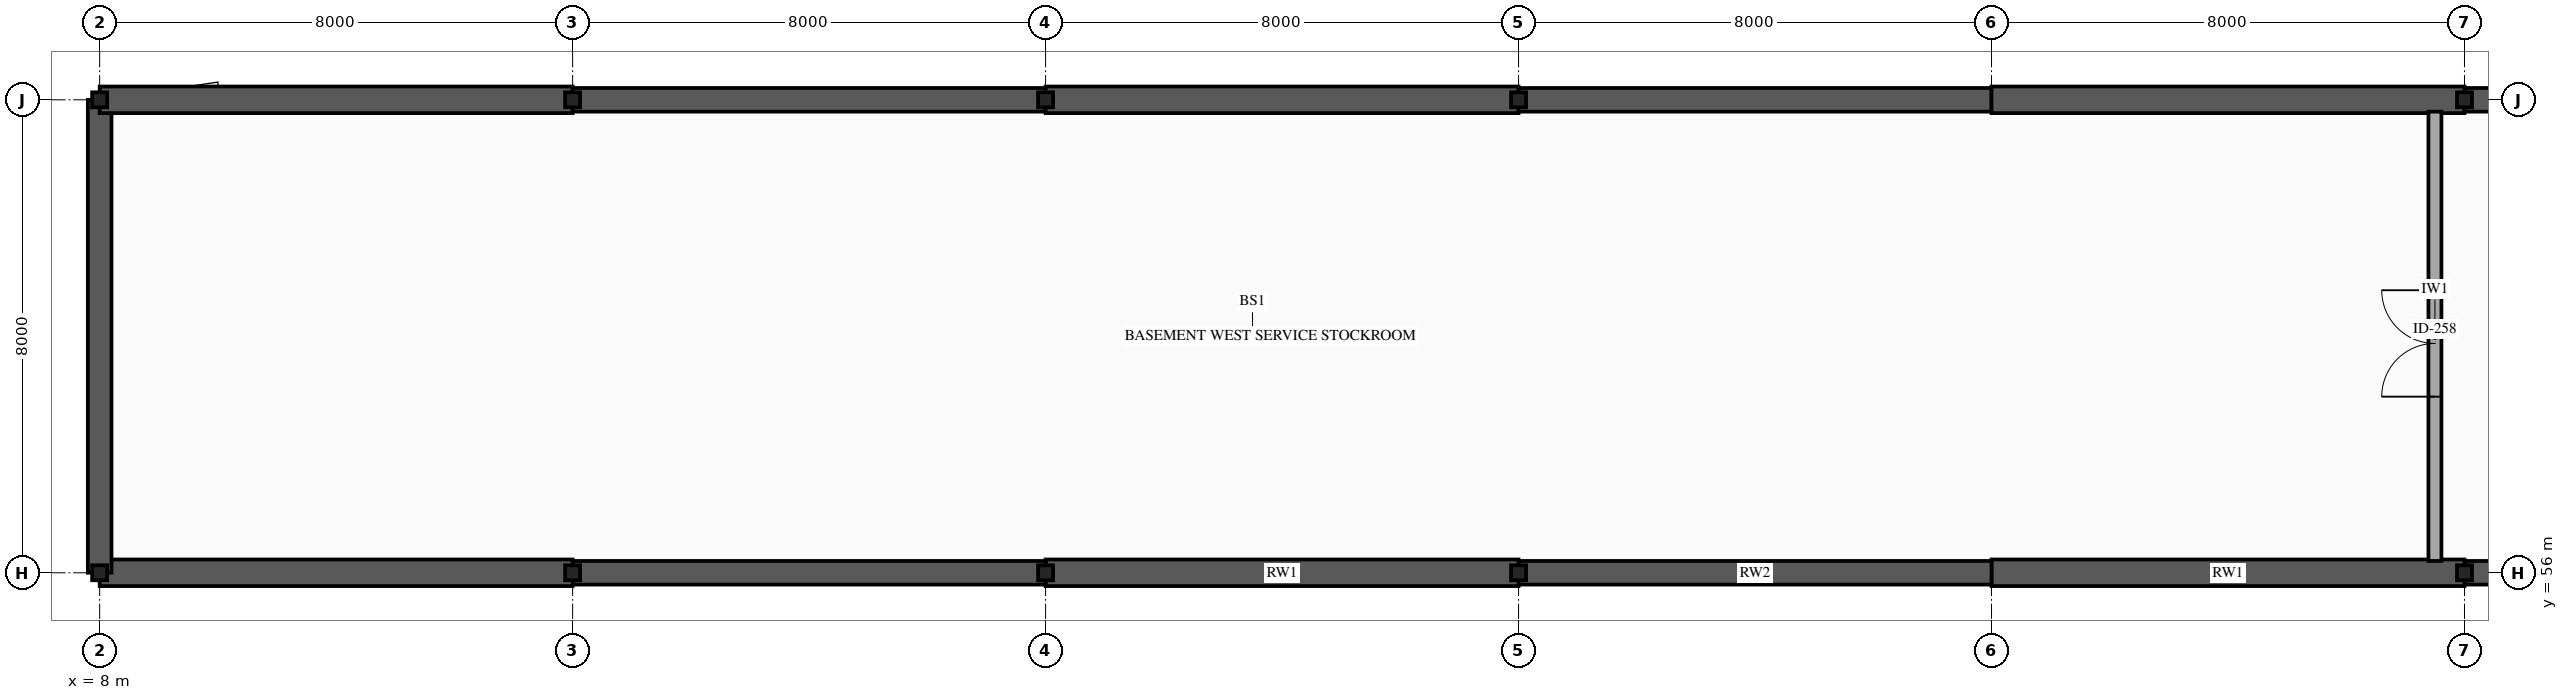
"""IFC4 building model, lengths in metres.
Left out: names, types, materials, properties, quantities, classifications, styles, units other than length and angle.
Written with IfcOpenShell. Run it as: python <this file> out.ifc"""

import sys

from ifc_helpers import new_model, si_unit, direction, frame, frame_2d, origin, origin_2d, place, context, subcontext, project, spatial, rectangle, hollow_rectangle, extrude, element, fill, save


model = new_model("IFC4")
c1 = context("Model", 3, precision=1e-05, world=origin(), true_north=direction((0.0, 1.0)))
c2 = subcontext(c1, "Body", "Model", "MODEL_VIEW")
j1 = project(units=[si_unit("LENGTHUNIT", "METRE"), si_unit("PLANEANGLEUNIT", "RADIAN")], contexts=[c1])
p1 = place(None, origin())
s1 = spatial("IfcSite", under=j1, at=p1, CompositionType="ELEMENT")
p2 = place(p1, origin())
s2 = spatial("IfcBuilding", under=s1, at=p2, CompositionType="ELEMENT")
p3 = place(p2, frame((0.0, 0.0, -4.8)))
s3 = spatial("IfcBuildingStorey", under=s2, at=p3, CompositionType="ELEMENT", Elevation=-4.8)
for number, where, z_axis, x_axis in (
    (1, (8.0, 56.0, 0.0), (0.0, 0.0, 1.0), (1.0, 0.0, 0.0)),
    (2, (8.0, 64.0, 0.0), (0.0, 0.0, 1.0), (1.0, 0.0, 0.0)),
    (3, (16.0, 56.0, 0.0), (0.0, 0.0, 1.0), (1.0, 0.0, 0.0)),
    (4, (16.0, 64.0, 0.0), (0.0, 0.0, 1.0), (1.0, 0.0, 0.0)),
    (5, (24.0, 56.0, 0.0), (0.0, 0.0, 1.0), (1.0, 0.0, 0.0)),
    (6, (24.0, 64.0, 0.0), (0.0, 0.0, 1.0), (1.0, 0.0, 0.0)),
    (7, (32.0, 56.0, 0.0), (0.0, 0.0, 1.0), (1.0, 0.0, 0.0)),
    (8, (32.0, 64.0, 0.0), (0.0, 0.0, 1.0), (1.0, 0.0, 0.0)),
    (9, (48.0, 56.0, 0.0), (0.0, 0.0, 1.0), (1.0, 0.0, 0.0)),
    (10, (48.0, 64.0, 0.0), (0.0, 0.0, 1.0), (1.0, 0.0, 0.0)),
):
    element("IfcColumn", number, at=place(p3, frame(where, z_axis=z_axis, x_axis=x_axis)), inside=s3, PredefinedType="COLUMN", context=c2, shape_type="SweptSolid", body=[
        extrude(hollow_rectangle(XDim=0.254, YDim=0.254, WallThickness=0.009, InnerFilletRadius=0.009, OuterFilletRadius=0.018, at=origin_2d()), origin(), (0.0, 0.0, 1.0), 4.8),
    ])
p4 = place(p3, frame((56.0, 56.0, 0.0), z_axis=(0.0, 0.0, 1.0), x_axis=(-1.0, 0.0, 0.0)))
e11 = element("IfcWall", 11, at=p4, inside=s3, PredefinedType="USERDEFINED", context=c2, shape_type="SweptSolid", body=[
    extrude(rectangle(XDim=8.0, YDim=0.4, at=frame_2d((4.0, 0.0))), origin(), (0.0, 0.0, 1.0), 4.5),
])
p5 = place(p3, frame((48.0, 56.0, 0.0), z_axis=(0.0, 0.0, 1.0), x_axis=(-1.0, 0.0, 0.0)))
e12 = element("IfcWall", 12, at=p5, inside=s3, PredefinedType="USERDEFINED", context=c2, shape_type="SweptSolid", body=[
    extrude(rectangle(XDim=8.0, YDim=0.45, at=frame_2d((4.0, 0.0))), origin(), (0.0, 0.0, 1.0), 4.5),
])
p6 = place(p3, frame((40.0, 56.0, 0.0), z_axis=(0.0, 0.0, 1.0), x_axis=(-1.0, 0.0, 0.0)))
e13 = element("IfcWall", 13, at=p6, inside=s3, PredefinedType="USERDEFINED", context=c2, shape_type="SweptSolid", body=[
    extrude(rectangle(XDim=8.0, YDim=0.4, at=frame_2d((4.0, 0.0))), origin(), (0.0, 0.0, 1.0), 4.5),
])
p7 = place(p3, frame((32.0, 56.0, 0.0), z_axis=(0.0, 0.0, 1.0), x_axis=(-1.0, 0.0, 0.0)))
e14 = element("IfcWall", 14, at=p7, inside=s3, PredefinedType="USERDEFINED", context=c2, shape_type="SweptSolid", body=[
    extrude(rectangle(XDim=8.0, YDim=0.45, at=frame_2d((4.0, 0.0))), origin(), (0.0, 0.0, 1.0), 4.5),
])
p8 = place(p3, frame((24.0, 56.0, 0.0), z_axis=(0.0, 0.0, 1.0), x_axis=(-1.0, 0.0, 0.0)))
e15 = element("IfcWall", 15, at=p8, inside=s3, PredefinedType="USERDEFINED", context=c2, shape_type="SweptSolid", body=[
    extrude(rectangle(XDim=8.0, YDim=0.4, at=frame_2d((4.0, 0.0))), origin(), (0.0, 0.0, 1.0), 4.5),
])
p9 = place(p3, frame((16.0, 56.0, 0.0), z_axis=(0.0, 0.0, 1.0), x_axis=(-1.0, 0.0, 0.0)))
e16 = element("IfcWall", 16, at=p9, inside=s3, PredefinedType="USERDEFINED", context=c2, shape_type="SweptSolid", body=[
    extrude(rectangle(XDim=8.0, YDim=0.45, at=frame_2d((4.0, 0.0))), origin(), (0.0, 0.0, 1.0), 4.5),
])
p10 = place(p3, frame((8.0, 56.0, 0.0), z_axis=(0.0, 0.0, 1.0), x_axis=(0.0, 1.0, 0.0)))
e17 = element("IfcWall", 17, at=p10, inside=s3, PredefinedType="USERDEFINED", context=c2, shape_type="SweptSolid", body=[
    extrude(rectangle(XDim=8.0, YDim=0.4, at=frame_2d((4.0, 0.0))), origin(), (0.0, 0.0, 1.0), 4.5),
])
p11 = place(p3, frame((8.0, 64.0, 0.0), z_axis=(0.0, 0.0, 1.0), x_axis=(1.0, 0.0, 0.0)))
e18 = element("IfcWall", 18, at=p11, inside=s3, PredefinedType="USERDEFINED", context=c2, shape_type="SweptSolid", body=[
    extrude(rectangle(XDim=8.0, YDim=0.45, at=frame_2d((4.0, 0.0))), origin(), (0.0, 0.0, 1.0), 4.5),
])
p12 = place(p3, frame((16.0, 64.0, 0.0), z_axis=(0.0, 0.0, 1.0), x_axis=(1.0, 0.0, 0.0)))
e19 = element("IfcWall", 19, at=p12, inside=s3, PredefinedType="USERDEFINED", context=c2, shape_type="SweptSolid", body=[
    extrude(rectangle(XDim=8.0, YDim=0.4, at=frame_2d((4.0, 0.0))), origin(), (0.0, 0.0, 1.0), 4.5),
])
p13 = place(p3, frame((24.0, 64.0, 0.0), z_axis=(0.0, 0.0, 1.0), x_axis=(1.0, 0.0, 0.0)))
e20 = element("IfcWall", 20, at=p13, inside=s3, PredefinedType="USERDEFINED", context=c2, shape_type="SweptSolid", body=[
    extrude(rectangle(XDim=8.0, YDim=0.45, at=frame_2d((4.0, 0.0))), origin(), (0.0, 0.0, 1.0), 4.5),
])
p14 = place(p3, frame((32.0, 64.0, 0.0), z_axis=(0.0, 0.0, 1.0), x_axis=(1.0, 0.0, 0.0)))
e21 = element("IfcWall", 21, at=p14, inside=s3, PredefinedType="USERDEFINED", context=c2, shape_type="SweptSolid", body=[
    extrude(rectangle(XDim=8.0, YDim=0.4, at=frame_2d((4.0, 0.0))), origin(), (0.0, 0.0, 1.0), 4.5),
])
p15 = place(p3, frame((40.0, 64.0, 0.0), z_axis=(0.0, 0.0, 1.0), x_axis=(1.0, 0.0, 0.0)))
e22 = element("IfcWall", 22, at=p15, inside=s3, PredefinedType="USERDEFINED", context=c2, shape_type="SweptSolid", body=[
    extrude(rectangle(XDim=8.0, YDim=0.45, at=frame_2d((4.0, 0.0))), origin(), (0.0, 0.0, 1.0), 4.5),
])
p16 = place(p3, frame((48.0, 64.0, 0.0), z_axis=(0.0, 0.0, 1.0), x_axis=(1.0, 0.0, 0.0)))
e23 = element("IfcWall", 23, at=p16, inside=s3, PredefinedType="USERDEFINED", context=c2, shape_type="SweptSolid", body=[
    extrude(rectangle(XDim=8.0, YDim=0.4, at=frame_2d((4.0, 0.0))), origin(), (0.0, 0.0, 1.0), 4.5),
])
p17 = place(p3, frame((47.5, 56.2, 0.0), z_axis=(0.0, 0.0, 1.0), x_axis=(0.0, 1.0, 0.0)))
e24 = element("IfcWall", 24, at=p17, inside=s3, PredefinedType="PARTITIONING", context=c2, shape_type="SweptSolid", body=[
    extrude(rectangle(XDim=7.6, YDim=0.22, at=frame_2d((3.8, 0.0))), origin(), (0.0, 0.0, 1.0), 3.78),
])
p18 = place(p17, frame((2.779, 0.0, 0.0)))
e25 = element("IfcOpeningElement", 25, at=p18, cuts=e24, PredefinedType="OPENING", context=c2, shape_type="SweptSolid", body=[
    extrude(rectangle(XDim=1.8, YDim=2.25, at=frame_2d((0.9, 1.125))), frame((0.0, 0.12, 0.0), z_axis=(0.0, -1.0, 0.0), x_axis=(1.0, 0.0, 0.0)), (0.0, 0.0, 1.0), 0.24),
])
p19 = place(p18, origin())
e26 = element("IfcDoor", 26, at=p19, inside=s3, OperationType="DOUBLE_DOOR_SINGLE_SWING", PredefinedType="DOOR", context=c2, shape_type="SweptSolid", body=[
    extrude(rectangle(XDim=1.8, YDim=2.25, at=frame_2d((0.9, 1.125))), frame((0.0, 0.025, 0.0), z_axis=(0.0, -1.0, 0.0), x_axis=(1.0, 0.0, 0.0)), (0.0, 0.0, 1.0), 0.05),
])
fill(e25, e26)
save(model, sys.argv[1])
